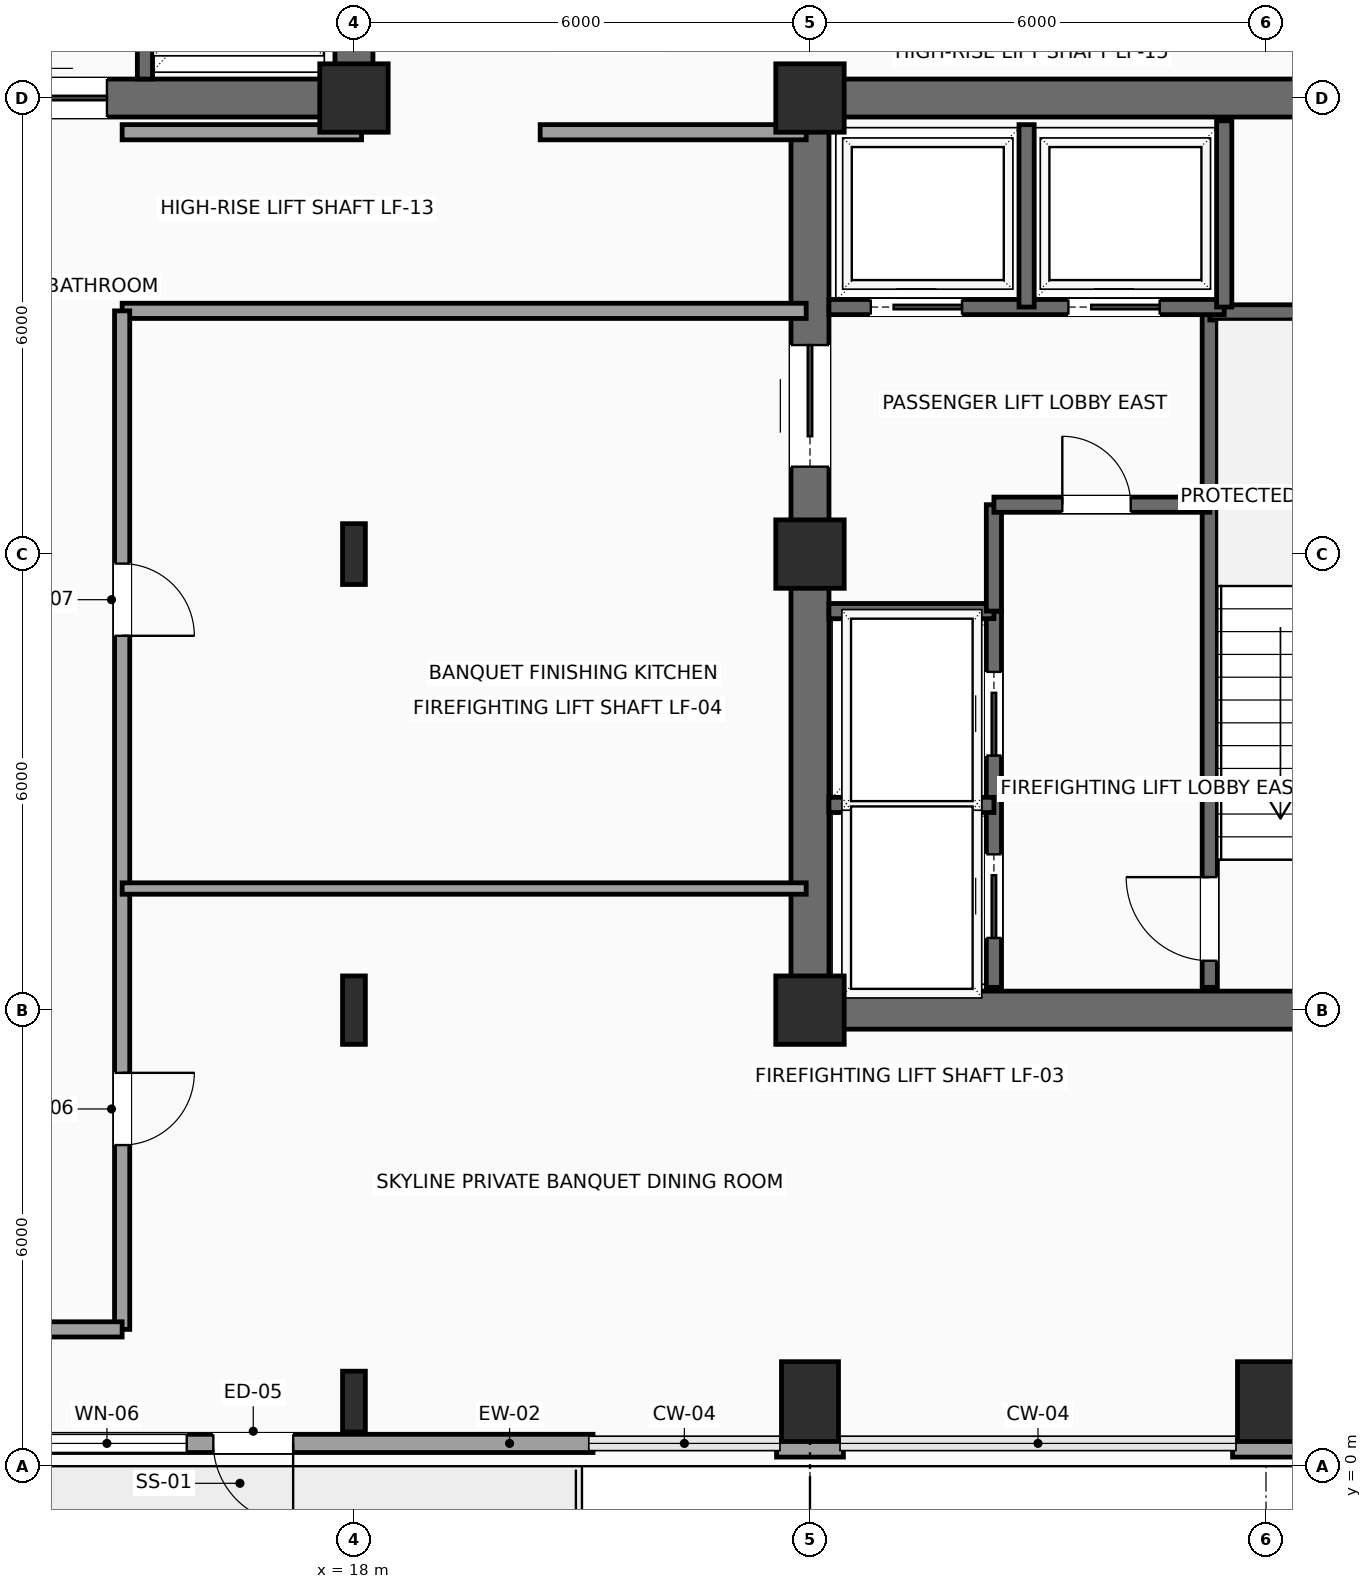
"""IFC4 building model, lengths in metres.
Left out: names, types, materials, properties, quantities, classifications, styles, units other than length and angle.
Written with IfcOpenShell. Run it as: python <this file> out.ifc"""

import sys

from ifc_helpers import new_model, si_unit, direction, frame, frame_2d, origin, origin_2d, place, context, subcontext, project, spatial, rectangle, i_section, extrude, element, fill, save


model = new_model("IFC4")
c1 = context("Model", 3, precision=1e-05, world=origin(), true_north=direction((0.0, 1.0)))
c2 = subcontext(c1, "Body", "Model", "MODEL_VIEW")
j1 = project(units=[si_unit("LENGTHUNIT", "METRE"), si_unit("PLANEANGLEUNIT", "RADIAN")], contexts=[c1])
p1 = place(None, origin())
s1 = spatial("IfcSite", under=j1, at=p1, CompositionType="ELEMENT")
p2 = place(p1, origin())
s2 = spatial("IfcBuilding", under=s1, at=p2, CompositionType="ELEMENT")
p3 = place(p2, frame((0.0, 0.0, 223.65)))
s3 = spatial("IfcBuildingStorey", under=s2, at=p3, CompositionType="ELEMENT", Elevation=223.65)
for number, where, z_axis, x_axis in (
    (1, (18.0, 18.0, 0.0), (0.0, 0.0, 1.0), (1.0, 0.0, 0.0)),
    (2, (24.0, 6.0, 0.0), (0.0, 0.0, 1.0), (1.0, 0.0, 0.0)),
    (3, (24.0, 12.0, 0.0), (0.0, 0.0, 1.0), (1.0, 0.0, 0.0)),
    (4, (24.0, 18.0, 0.0), (0.0, 0.0, 1.0), (1.0, 0.0, 0.0)),
):
    element("IfcColumn", number, at=place(p3, frame(where, z_axis=z_axis, x_axis=x_axis)), inside=s3, PredefinedType="COLUMN", context=c2, shape_type="SweptSolid", body=[
        extrude(rectangle(XDim=0.9, YDim=0.9, at=origin_2d()), origin(), (0.0, 0.0, 1.0), 3.75),
    ])
p4 = place(p3, frame((18.0, 0.85, 0.0), z_axis=(0.0, 0.0, 1.0), x_axis=(1.0, 0.0, 0.0)))
e5 = element("IfcColumn", 5, at=p4, inside=s3, PredefinedType="COLUMN", context=c2, shape_type="SweptSolid", body=[
    extrude(i_section(OverallWidth=0.3, OverallDepth=0.8, WebThickness=0.018, FlangeThickness=0.033, FilletRadius=0.03, at=origin_2d()), origin(), (0.0, 0.0, 1.0), 3.75),
])
p5 = place(p3, frame((18.0, 6.0, 0.0), z_axis=(0.0, 0.0, 1.0), x_axis=(1.0, 0.0, 0.0)))
e6 = element("IfcColumn", 6, at=p5, inside=s3, PredefinedType="COLUMN", context=c2, shape_type="SweptSolid", body=[
    extrude(i_section(OverallWidth=0.3, OverallDepth=0.9, WebThickness=0.019, FlangeThickness=0.035, FilletRadius=0.03, at=origin_2d()), origin(), (0.0, 0.0, 1.0), 3.75),
])
p6 = place(p3, frame((18.0, 12.0, 0.0), z_axis=(0.0, 0.0, 1.0), x_axis=(1.0, 0.0, 0.0)))
e7 = element("IfcColumn", 7, at=p6, inside=s3, PredefinedType="COLUMN", context=c2, shape_type="SweptSolid", body=[
    extrude(i_section(OverallWidth=0.3, OverallDepth=0.8, WebThickness=0.018, FlangeThickness=0.033, FilletRadius=0.03, at=origin_2d()), origin(), (0.0, 0.0, 1.0), 3.75),
])
for number, where, z_axis, x_axis in (
    (8, (24.0, 0.85, 0.0), (0.0, 0.0, 1.0), (1.0, 0.0, 0.0)),
    (9, (30.0, 0.85, 0.0), (0.0, 0.0, 1.0), (1.0, 0.0, 0.0)),
):
    element("IfcColumn", number, at=place(p3, frame(where, z_axis=z_axis, x_axis=x_axis)), inside=s3, PredefinedType="COLUMN", context=c2, shape_type="SweptSolid", body=[
        extrude(rectangle(XDim=0.75, YDim=1.05, at=origin_2d()), origin(), (0.0, 0.0, 1.0), 3.75),
    ])
p7 = place(p3, frame((21.145, 0.3, 0.0), z_axis=(0.0, 0.0, 1.0), x_axis=(-1.0, 0.0, 0.0)))
e10 = element("IfcWall", 10, at=p7, inside=s3, PredefinedType="SOLIDWALL", context=c2, shape_type="SweptSolid", body=[
    extrude(rectangle(XDim=9.29, YDim=0.24, at=frame_2d((4.645, 0.0))), origin(), (0.0, 0.0, 1.0), 3.54),
])
p8 = place(p7, frame((3.945, 0.0, 0.0)))
e11 = element("IfcOpeningElement", 11, at=p8, cuts=e10, PredefinedType="OPENING", context=c2, shape_type="SweptSolid", body=[
    extrude(rectangle(XDim=1.05, YDim=2.2, at=frame_2d((0.525, 1.1))), frame((0.0, 0.13, 0.0), z_axis=(0.0, -1.0, 0.0), x_axis=(1.0, 0.0, 0.0)), (0.0, 0.0, 1.0), 0.26),
])
p9 = place(p7, frame((5.345, 0.0, 0.85)))
e12 = element("IfcOpeningElement", 12, at=p9, cuts=e10, PredefinedType="OPENING", context=c2, shape_type="SweptSolid", body=[
    extrude(rectangle(XDim=2.1, YDim=2.2, at=frame_2d((1.05, 1.1))), frame((0.0, 0.13, 0.0), z_axis=(0.0, -1.0, 0.0), x_axis=(1.0, 0.0, 0.0)), (0.0, 0.0, 1.0), 0.26),
])
for number, where, z_axis, x_axis in (
    (13, (30.44, 0.24, 0.0), (0.0, 0.0, 1.0), (-1.0, 0.0, 0.0)),
    (14, (24.44, 0.24, 0.0), (0.0, 0.0, 1.0), (-1.0, 0.0, 0.0)),
):
    element("IfcWall", number, at=place(p3, frame(where, z_axis=z_axis, x_axis=x_axis)), inside=s3, PredefinedType="SOLIDWALL", context=c2, shape_type="SweptSolid", body=[
        extrude(rectangle(XDim=0.88, YDim=0.24, at=frame_2d((0.44, 0.0))), origin(), (0.0, 0.0, 1.0), 3.54),
    ])
p10 = place(p3, frame((6.0, 18.0, 0.0), z_axis=(0.0, 0.0, 1.0), x_axis=(1.0, 0.0, 0.0)))
e15 = element("IfcWall", 15, at=p10, inside=s3, PredefinedType="SHEAR", context=c2, shape_type="SweptSolid", body=[
    extrude(rectangle(XDim=12.0, YDim=0.5, at=frame_2d((6.0, 0.0))), origin(), (0.0, 0.0, 1.0), 3.54),
])
p11 = place(p10, frame((7.15, 0.0, 0.0)))
e16 = element("IfcOpeningElement", 16, at=p11, cuts=e15, PredefinedType="OPENING", context=c2, shape_type="SweptSolid", body=[
    extrude(rectangle(XDim=1.6, YDim=2.3, at=frame_2d((0.8, 1.15))), frame((0.0, 0.26, 0.0), z_axis=(0.0, -1.0, 0.0), x_axis=(1.0, 0.0, 0.0)), (0.0, 0.0, 1.0), 0.52),
])
for number, where, z_axis, x_axis in (
    (17, (18.0, 18.0, 0.0), (0.0, 0.0, 1.0), (0.0, 1.0, 0.0)),
    (18, (24.0, 6.0, 0.0), (0.0, 0.0, 1.0), (1.0, 0.0, 0.0)),
    (19, (24.0, 18.0, 0.0), (0.0, 0.0, 1.0), (1.0, 0.0, 0.0)),
):
    element("IfcWall", number, at=place(p3, frame(where, z_axis=z_axis, x_axis=x_axis)), inside=s3, PredefinedType="SHEAR", context=c2, shape_type="SweptSolid", body=[
        extrude(rectangle(XDim=9.6, YDim=0.5, at=frame_2d((4.8, 0.0))), origin(), (0.0, 0.0, 1.0), 3.54),
    ])
p12 = place(p3, frame((24.0, 6.0, 0.0), z_axis=(0.0, 0.0, 1.0), x_axis=(0.0, 1.0, 0.0)))
e20 = element("IfcWall", 20, at=p12, inside=s3, PredefinedType="SHEAR", context=c2, shape_type="SweptSolid", body=[
    extrude(rectangle(XDim=12.0, YDim=0.5, at=frame_2d((6.0, 0.0))), origin(), (0.0, 0.0, 1.0), 3.54),
])
p13 = place(p12, frame((7.15, 0.0, 0.0)))
e21 = element("IfcOpeningElement", 21, at=p13, cuts=e20, PredefinedType="OPENING", context=c2, shape_type="SweptSolid", body=[
    extrude(rectangle(XDim=1.6, YDim=2.3, at=frame_2d((0.8, 1.15))), frame((0.0, 0.26, 0.0), z_axis=(0.0, -1.0, 0.0), x_axis=(1.0, 0.0, 0.0)), (0.0, 0.0, 1.0), 0.52),
])
p14 = place(p3, frame((29.26, 6.3, 0.0), z_axis=(0.0, 0.0, 1.0), x_axis=(0.0, 1.0, 0.0)))
e22 = element("IfcWall", 22, at=p14, inside=s3, PredefinedType="SHEAR", context=c2, shape_type="SweptSolid", body=[
    extrude(rectangle(XDim=8.88, YDim=0.2, at=frame_2d((4.44, 0.0))), origin(), (0.0, 0.0, 1.0), 3.54),
])
p15 = place(p14, frame((0.35, 0.0, 0.0)))
e23 = element("IfcOpeningElement", 23, at=p15, cuts=e22, PredefinedType="OPENING", context=c2, shape_type="SweptSolid", body=[
    extrude(rectangle(XDim=1.1, YDim=2.2, at=frame_2d((0.55, 1.1))), frame((0.0, 0.11, 0.0), z_axis=(0.0, -1.0, 0.0), x_axis=(1.0, 0.0, 0.0)), (0.0, 0.0, 1.0), 0.22),
])
p16 = place(p3, frame((29.26, 15.18, 0.0), z_axis=(0.0, 0.0, 1.0), x_axis=(1.0, 0.0, 0.0)))
e24 = element("IfcWall", 24, at=p16, inside=s3, PredefinedType="SHEAR", context=c2, shape_type="SweptSolid", body=[
    extrude(rectangle(XDim=4.04, YDim=0.2, at=frame_2d((2.02, 0.0))), origin(), (0.0, 0.0, 1.0), 3.54),
])
p17 = place(p3, frame((26.42, 6.3, 0.0), z_axis=(0.0, 0.0, 1.0), x_axis=(0.0, 1.0, 0.0)))
e25 = element("IfcWall", 25, at=p17, inside=s3, PredefinedType="SHEAR", context=c2, shape_type="SweptSolid", body=[
    extrude(rectangle(XDim=4.95, YDim=0.2, at=frame_2d((2.475, 0.0))), origin(), (0.0, 0.0, 1.0), 3.54),
])
p18 = place(p17, frame((0.65, 0.0, 0.0)))
e26 = element("IfcOpeningElement", 26, at=p18, cuts=e25, PredefinedType="OPENING", context=c2, shape_type="SweptSolid", body=[
    extrude(rectangle(XDim=1.1, YDim=2.2, at=frame_2d((0.55, 1.1))), frame((0.0, 0.11, 0.0), z_axis=(0.0, -1.0, 0.0), x_axis=(1.0, 0.0, 0.0)), (0.0, 0.0, 1.0), 0.22),
])
p19 = place(p17, frame((3.05, 0.0, 0.0)))
e27 = element("IfcOpeningElement", 27, at=p19, cuts=e25, PredefinedType="OPENING", context=c2, shape_type="SweptSolid", body=[
    extrude(rectangle(XDim=1.1, YDim=2.2, at=frame_2d((0.55, 1.1))), frame((0.0, 0.11, 0.0), z_axis=(0.0, -1.0, 0.0), x_axis=(1.0, 0.0, 0.0)), (0.0, 0.0, 1.0), 0.22),
])
for number, where, z_axis, x_axis in (
    (28, (24.25, 8.7, 0.0), (0.0, 0.0, 1.0), (1.0, 0.0, 0.0)),
    (29, (24.25, 11.25, 0.0), (0.0, 0.0, 1.0), (1.0, 0.0, 0.0)),
):
    element("IfcWall", number, at=place(p3, frame(where, z_axis=z_axis, x_axis=x_axis)), inside=s3, PredefinedType="SHEAR", context=c2, shape_type="SweptSolid", body=[
        extrude(rectangle(XDim=2.17, YDim=0.2, at=frame_2d((1.085, 0.0))), origin(), (0.0, 0.0, 1.0), 3.54),
    ])
p20 = place(p3, frame((26.42, 11.25, 0.0), z_axis=(0.0, 0.0, 1.0), x_axis=(0.0, 1.0, 0.0)))
e30 = element("IfcWall", 30, at=p20, inside=s3, PredefinedType="SHEAR", context=c2, shape_type="SweptSolid", body=[
    extrude(rectangle(XDim=1.4, YDim=0.2, at=frame_2d((0.7, 0.0))), origin(), (0.0, 0.0, 1.0), 3.54),
])
p21 = place(p3, frame((26.42, 12.65, 0.0), z_axis=(0.0, 0.0, 1.0), x_axis=(1.0, 0.0, 0.0)))
e31 = element("IfcWall", 31, at=p21, inside=s3, PredefinedType="SHEAR", context=c2, shape_type="SweptSolid", body=[
    extrude(rectangle(XDim=2.84, YDim=0.2, at=frame_2d((1.42, 0.0))), origin(), (0.0, 0.0, 1.0), 3.54),
])
p22 = place(p21, frame((0.9, 0.0, 0.0)))
e32 = element("IfcOpeningElement", 32, at=p22, cuts=e31, PredefinedType="OPENING", context=c2, shape_type="SweptSolid", body=[
    extrude(rectangle(XDim=0.9, YDim=2.15, at=frame_2d((0.45, 1.075))), frame((0.0, 0.11, 0.0), z_axis=(0.0, -1.0, 0.0), x_axis=(1.0, 0.0, 0.0)), (0.0, 0.0, 1.0), 0.22),
])
p23 = place(p3, frame((15.25, 18.25, 0.0), z_axis=(0.0, 0.0, 1.0), x_axis=(0.0, 1.0, 0.0)))
e33 = element("IfcWall", 33, at=p23, inside=s3, PredefinedType="SHEAR", context=c2, shape_type="SweptSolid", body=[
    extrude(rectangle(XDim=5.2, YDim=0.2, at=frame_2d((2.6, 0.0))), origin(), (0.0, 0.0, 1.0), 3.54),
])
p24 = place(p23, frame((0.55, 0.0, 0.0)))
e34 = element("IfcOpeningElement", 34, at=p24, cuts=e33, PredefinedType="OPENING", context=c2, shape_type="SweptSolid", body=[
    extrude(rectangle(XDim=1.2, YDim=2.2, at=frame_2d((0.6, 1.1))), frame((0.0, 0.11, 0.0), z_axis=(0.0, -1.0, 0.0), x_axis=(1.0, 0.0, 0.0)), (0.0, 0.0, 1.0), 0.22),
])
p25 = place(p23, frame((3.15, 0.0, 0.0)))
e35 = element("IfcOpeningElement", 35, at=p25, cuts=e33, PredefinedType="OPENING", context=c2, shape_type="SweptSolid", body=[
    extrude(rectangle(XDim=1.2, YDim=2.2, at=frame_2d((0.6, 1.1))), frame((0.0, 0.11, 0.0), z_axis=(0.0, -1.0, 0.0), x_axis=(1.0, 0.0, 0.0)), (0.0, 0.0, 1.0), 0.22),
])
p26 = place(p3, frame((24.25, 15.25, 0.0), z_axis=(0.0, 0.0, 1.0), x_axis=(1.0, 0.0, 0.0)))
e36 = element("IfcWall", 36, at=p26, inside=s3, PredefinedType="SHEAR", context=c2, shape_type="SweptSolid", body=[
    extrude(rectangle(XDim=5.2, YDim=0.2, at=frame_2d((2.6, 0.0))), origin(), (0.0, 0.0, 1.0), 3.54),
])
p27 = place(p26, frame((0.55, 0.0, 0.0)))
e37 = element("IfcOpeningElement", 37, at=p27, cuts=e36, PredefinedType="OPENING", context=c2, shape_type="SweptSolid", body=[
    extrude(rectangle(XDim=1.2, YDim=2.2, at=frame_2d((0.6, 1.1))), frame((0.0, 0.11, 0.0), z_axis=(0.0, -1.0, 0.0), x_axis=(1.0, 0.0, 0.0)), (0.0, 0.0, 1.0), 0.22),
])
p28 = place(p26, frame((3.15, 0.0, 0.0)))
e38 = element("IfcOpeningElement", 38, at=p28, cuts=e36, PredefinedType="OPENING", context=c2, shape_type="SweptSolid", body=[
    extrude(rectangle(XDim=1.2, YDim=2.2, at=frame_2d((0.6, 1.1))), frame((0.0, 0.11, 0.0), z_axis=(0.0, -1.0, 0.0), x_axis=(1.0, 0.0, 0.0)), (0.0, 0.0, 1.0), 0.22),
])
p29 = place(p3, frame((26.85, 15.25, 0.0), z_axis=(0.0, 0.0, 1.0), x_axis=(0.0, 1.0, 0.0)))
e39 = element("IfcWall", 39, at=p29, inside=s3, PredefinedType="SHEAR", context=c2, shape_type="SweptSolid", body=[
    extrude(rectangle(XDim=2.4, YDim=0.2, at=frame_2d((1.2, 0.0))), origin(), (0.0, 0.0, 1.0), 3.54),
])
p30 = place(p3, frame((29.45, 15.25, 0.0), z_axis=(0.0, 0.0, 1.0), x_axis=(0.0, 1.0, 0.0)))
e40 = element("IfcWall", 40, at=p30, inside=s3, PredefinedType="SHEAR", context=c2, shape_type="SweptSolid", body=[
    extrude(rectangle(XDim=2.45, YDim=0.2, at=frame_2d((1.225, 0.0))), origin(), (0.0, 0.0, 1.0), 3.54),
])
p31 = place(p3, frame((14.95, 17.55, 0.0), z_axis=(0.0, 0.0, 1.0), x_axis=(1.0, 0.0, 0.0)))
e41 = element("IfcWall", 41, at=p31, inside=s3, PredefinedType="SOLIDWALL", context=c2, shape_type="SweptSolid", body=[
    extrude(rectangle(XDim=3.15, YDim=0.2, at=frame_2d((1.575, 0.0))), origin(), (0.0, 0.0, 1.0), 3.54),
])
p32 = place(p3, frame((20.45, 17.55, 0.0), z_axis=(0.0, 0.0, 1.0), x_axis=(1.0, 0.0, 0.0)))
e42 = element("IfcWall", 42, at=p32, inside=s3, PredefinedType="SOLIDWALL", context=c2, shape_type="SweptSolid", body=[
    extrude(rectangle(XDim=3.5, YDim=0.2, at=frame_2d((1.75, 0.0))), origin(), (0.0, 0.0, 1.0), 3.54),
])
p33 = place(p3, frame((23.95, 15.2, 0.0), z_axis=(0.0, 0.0, 1.0), x_axis=(-1.0, 0.0, 0.0)))
e43 = element("IfcWall", 43, at=p33, inside=s3, PredefinedType="SOLIDWALL", context=c2, shape_type="SweptSolid", body=[
    extrude(rectangle(XDim=9.0, YDim=0.2, at=frame_2d((4.5, 0.0))), origin(), (0.0, 0.0, 1.0), 3.132),
])
p34 = place(p3, frame((14.95, 15.2, 0.0), z_axis=(0.0, 0.0, 1.0), x_axis=(0.0, -1.0, 0.0)))
e44 = element("IfcWall", 44, at=p34, inside=s3, PredefinedType="SOLIDWALL", context=c2, shape_type="SweptSolid", body=[
    extrude(rectangle(XDim=13.4, YDim=0.2, at=frame_2d((6.7, 0.0))), origin(), (0.0, 0.0, 1.0), 3.54),
])
p35 = place(p34, frame((10.025, 0.0, 0.0)))
e45 = element("IfcOpeningElement", 45, at=p35, cuts=e44, PredefinedType="OPENING", context=c2, shape_type="SweptSolid", body=[
    extrude(rectangle(XDim=0.95, YDim=2.15, at=frame_2d((0.475, 1.075))), frame((0.0, 0.11, 0.0), z_axis=(0.0, -1.0, 0.0), x_axis=(1.0, 0.0, 0.0)), (0.0, 0.0, 1.0), 0.22),
])
p36 = place(p34, frame((3.325, 0.0, 0.0)))
e46 = element("IfcOpeningElement", 46, at=p36, cuts=e44, PredefinedType="OPENING", context=c2, shape_type="SweptSolid", body=[
    extrude(rectangle(XDim=0.95, YDim=2.15, at=frame_2d((0.475, 1.075))), frame((0.0, 0.11, 0.0), z_axis=(0.0, -1.0, 0.0), x_axis=(1.0, 0.0, 0.0)), (0.0, 0.0, 1.0), 0.22),
])
p37 = place(p3, frame((14.95, 1.8, 0.0), z_axis=(0.0, 0.0, 1.0), x_axis=(-1.0, 0.0, 0.0)))
e47 = element("IfcWall", 47, at=p37, inside=s3, PredefinedType="SOLIDWALL", context=c2, shape_type="SweptSolid", body=[
    extrude(rectangle(XDim=2.35, YDim=0.2, at=frame_2d((1.175, 0.0))), origin(), (0.0, 0.0, 1.0), 3.54),
])
p38 = place(p3, frame((14.95, 7.6, 0.0), z_axis=(0.0, 0.0, 1.0), x_axis=(1.0, 0.0, 0.0)))
e48 = element("IfcWall", 48, at=p38, inside=s3, PredefinedType="PARTITIONING", context=c2, shape_type="SweptSolid", body=[
    extrude(rectangle(XDim=9.0, YDim=0.15, at=frame_2d((4.5, 0.0))), origin(), (0.0, 0.0, 1.0), 3.54),
])
p39 = place(p8, origin())
e49 = element("IfcDoor", 49, at=p39, inside=s3, OperationType="SINGLE_SWING_LEFT", PredefinedType="DOOR", context=c2, shape_type="SweptSolid", body=[
    extrude(rectangle(XDim=1.05, YDim=2.2, at=frame_2d((0.525, 1.1))), frame((0.0, 0.025, 0.0), z_axis=(0.0, -1.0, 0.0), x_axis=(1.0, 0.0, 0.0)), (0.0, 0.0, 1.0), 0.05),
])
fill(e11, e49)
p40 = place(p9, origin())
e50 = element("IfcWindow", 50, at=p40, inside=s3, PartitioningType="SINGLE_PANEL", PredefinedType="WINDOW", context=c2, shape_type="SweptSolid", body=[
    extrude(rectangle(XDim=2.1, YDim=2.2, at=frame_2d((1.05, 1.1))), frame((0.0, 0.03, 0.0), z_axis=(0.0, -1.0, 0.0), x_axis=(1.0, 0.0, 0.0)), (0.0, 0.0, 1.0), 0.06),
])
fill(e12, e50)
p41 = place(p11, origin())
e51 = element("IfcDoor", 51, at=p41, inside=s3, OperationType="DOUBLE_DOOR_SLIDING", PredefinedType="DOOR", context=c2, shape_type="SweptSolid", body=[
    extrude(rectangle(XDim=1.6, YDim=2.3, at=frame_2d((0.8, 1.15))), frame((0.0, 0.025, 0.0), z_axis=(0.0, -1.0, 0.0), x_axis=(1.0, 0.0, 0.0)), (0.0, 0.0, 1.0), 0.05),
])
fill(e16, e51)
p42 = place(p13, origin())
e52 = element("IfcDoor", 52, at=p42, inside=s3, OperationType="DOUBLE_DOOR_SLIDING", PredefinedType="DOOR", context=c2, shape_type="SweptSolid", body=[
    extrude(rectangle(XDim=1.6, YDim=2.3, at=frame_2d((0.8, 1.15))), frame((0.0, 0.025, 0.0), z_axis=(0.0, -1.0, 0.0), x_axis=(1.0, 0.0, 0.0)), (0.0, 0.0, 1.0), 0.05),
])
fill(e21, e52)
p43 = place(p15, origin())
e53 = element("IfcDoor", 53, at=p43, inside=s3, OperationType="SINGLE_SWING_RIGHT", PredefinedType="DOOR", context=c2, shape_type="SweptSolid", body=[
    extrude(rectangle(XDim=1.1, YDim=2.2, at=frame_2d((0.55, 1.1))), frame((0.0, 0.025, 0.0), z_axis=(0.0, -1.0, 0.0), x_axis=(1.0, 0.0, 0.0)), (0.0, 0.0, 1.0), 0.05),
])
fill(e23, e53)
p44 = place(p18, origin())
e54 = element("IfcDoor", 54, at=p44, inside=s3, OperationType="SLIDING_TO_LEFT", PredefinedType="DOOR", context=c2, shape_type="SweptSolid", body=[
    extrude(rectangle(XDim=1.1, YDim=2.2, at=frame_2d((0.55, 1.1))), frame((0.0, 0.025, 0.0), z_axis=(0.0, -1.0, 0.0), x_axis=(1.0, 0.0, 0.0)), (0.0, 0.0, 1.0), 0.05),
])
fill(e26, e54)
p45 = place(p19, origin())
e55 = element("IfcDoor", 55, at=p45, inside=s3, OperationType="SLIDING_TO_LEFT", PredefinedType="DOOR", context=c2, shape_type="SweptSolid", body=[
    extrude(rectangle(XDim=1.1, YDim=2.2, at=frame_2d((0.55, 1.1))), frame((0.0, 0.025, 0.0), z_axis=(0.0, -1.0, 0.0), x_axis=(1.0, 0.0, 0.0)), (0.0, 0.0, 1.0), 0.05),
])
fill(e27, e55)
p46 = place(p22, origin())
e56 = element("IfcDoor", 56, at=p46, inside=s3, OperationType="SINGLE_SWING_LEFT", PredefinedType="DOOR", context=c2, shape_type="SweptSolid", body=[
    extrude(rectangle(XDim=0.9, YDim=2.15, at=frame_2d((0.45, 1.075))), frame((0.0, 0.025, 0.0), z_axis=(0.0, -1.0, 0.0), x_axis=(1.0, 0.0, 0.0)), (0.0, 0.0, 1.0), 0.05),
])
fill(e32, e56)
p47 = place(p27, origin())
e57 = element("IfcDoor", 57, at=p47, inside=s3, OperationType="SLIDING_TO_RIGHT", PredefinedType="DOOR", context=c2, shape_type="SweptSolid", body=[
    extrude(rectangle(XDim=1.2, YDim=2.2, at=frame_2d((0.6, 1.1))), frame((0.0, 0.025, 0.0), z_axis=(0.0, -1.0, 0.0), x_axis=(1.0, 0.0, 0.0)), (0.0, 0.0, 1.0), 0.05),
])
fill(e37, e57)
p48 = place(p28, origin())
e58 = element("IfcDoor", 58, at=p48, inside=s3, OperationType="SLIDING_TO_RIGHT", PredefinedType="DOOR", context=c2, shape_type="SweptSolid", body=[
    extrude(rectangle(XDim=1.2, YDim=2.2, at=frame_2d((0.6, 1.1))), frame((0.0, 0.025, 0.0), z_axis=(0.0, -1.0, 0.0), x_axis=(1.0, 0.0, 0.0)), (0.0, 0.0, 1.0), 0.05),
])
fill(e38, e58)
p49 = place(p35, origin())
e59 = element("IfcDoor", 59, at=p49, inside=s3, OperationType="SINGLE_SWING_LEFT", PredefinedType="DOOR", context=c2, shape_type="SweptSolid", body=[
    extrude(rectangle(XDim=0.95, YDim=2.15, at=frame_2d((0.475, 1.075))), frame((0.0, 0.025, 0.0), z_axis=(0.0, -1.0, 0.0), x_axis=(1.0, 0.0, 0.0)), (0.0, 0.0, 1.0), 0.05),
])
fill(e45, e59)
p50 = place(p36, origin())
e60 = element("IfcDoor", 60, at=p50, inside=s3, OperationType="SINGLE_SWING_RIGHT", PredefinedType="DOOR", context=c2, shape_type="SweptSolid", body=[
    extrude(rectangle(XDim=0.95, YDim=2.15, at=frame_2d((0.475, 1.075))), frame((0.0, 0.025, 0.0), z_axis=(0.0, -1.0, 0.0), x_axis=(1.0, 0.0, 0.0)), (0.0, 0.0, 1.0), 0.05),
])
fill(e46, e60)
save(model, sys.argv[1])
